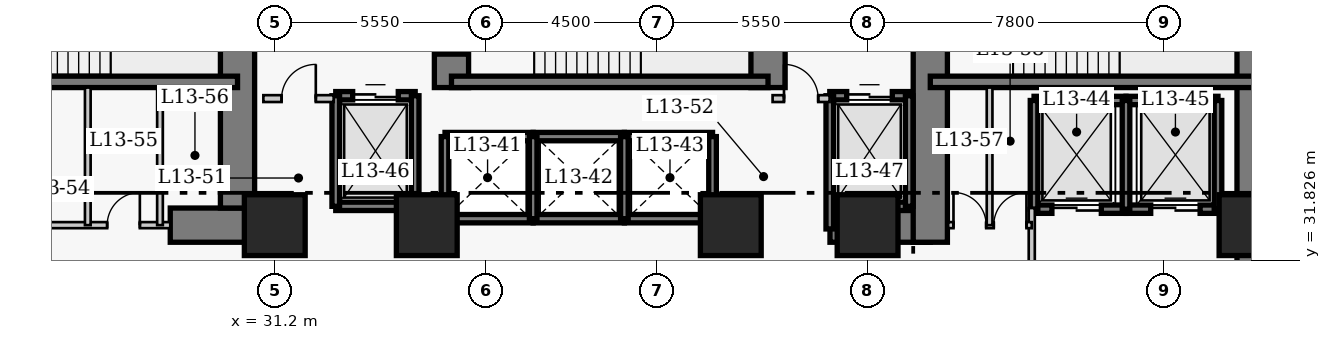
"""IFC4 building model, lengths in metres.
Left out: names, types, materials, properties, quantities, classifications, styles, units other than length and angle.
Written with IfcOpenShell. Run it as: python <this file> out.ifc"""

import sys

from ifc_helpers import new_model, si_unit, direction, frame, frame_2d, origin, origin_2d, place, context, subcontext, project, spatial, rectangle, extrude, element, fill, save


model = new_model("IFC4")
c1 = context("Model", 3, precision=1e-05, world=origin(), true_north=direction((0.0, 1.0)))
c2 = subcontext(c1, "Body", "Model", "MODEL_VIEW")
j1 = project(units=[si_unit("LENGTHUNIT", "METRE"), si_unit("PLANEANGLEUNIT", "RADIAN")], contexts=[c1])
p1 = place(None, origin())
s1 = spatial("IfcSite", under=j1, at=p1, CompositionType="ELEMENT")
p2 = place(p1, origin())
s2 = spatial("IfcBuilding", under=s1, at=p2, CompositionType="ELEMENT")
p3 = place(p2, frame((0.0, 0.0, 56.4)))
s3 = spatial("IfcBuildingStorey", under=s2, at=p3, CompositionType="ELEMENT", Elevation=56.4)
p4 = place(p3, frame((56.97, 27.05, 0.0), z_axis=(0.0, 0.0, 1.0), x_axis=(0.0, 1.0, 0.0)))
e1 = element("IfcWall", 1, at=p4, inside=s3, PredefinedType="SHEAR", context=c2, shape_type="SweptSolid", body=[
    extrude(rectangle(XDim=13.72, YDim=0.9, at=frame_2d((6.86, 0.0))), origin(), (0.0, 0.0, 1.0), 3.8),
])
p5 = place(p3, frame((28.45, 32.75, 0.0), z_axis=(0.0, 0.0, 1.0), x_axis=(1.0, 0.0, 0.0)))
e2 = element("IfcWall", 2, at=p5, inside=s3, PredefinedType="SHEAR", context=c2, shape_type="SweptSolid", body=[
    extrude(rectangle(XDim=2.4, YDim=0.9, at=frame_2d((1.2, 0.0))), origin(), (0.0, 0.0, 1.0), 3.8),
])
p6 = place(p3, frame((45.81, 32.75, 0.0), z_axis=(0.0, 0.0, 1.0), x_axis=(1.0, 0.0, 0.0)))
e3 = element("IfcWall", 3, at=p6, inside=s3, PredefinedType="SHEAR", context=c2, shape_type="SweptSolid", body=[
    extrude(rectangle(XDim=2.64, YDim=0.9, at=frame_2d((1.32, 0.0))), origin(), (0.0, 0.0, 1.0), 3.8),
])
p7 = place(p3, frame((30.22, 33.2, 0.0), z_axis=(0.0, 0.0, 1.0), x_axis=(0.0, 1.0, 0.0)))
e4 = element("IfcWall", 4, at=p7, inside=s3, PredefinedType="SHEAR", context=c2, shape_type="SweptSolid", body=[
    extrude(rectangle(XDim=7.12, YDim=0.9, at=frame_2d((3.56, 0.0))), origin(), (0.0, 0.0, 1.0), 3.8),
])
p8 = place(p3, frame((35.85, 36.37, 0.0), z_axis=(0.0, 0.0, 1.0), x_axis=(0.0, 1.0, 0.0)))
e5 = element("IfcWall", 5, at=p8, inside=s3, PredefinedType="SHEAR", context=c2, shape_type="SweptSolid", body=[
    extrude(rectangle(XDim=3.95, YDim=0.9, at=frame_2d((1.975, 0.0))), origin(), (0.0, 0.0, 1.0), 3.8),
])
p9 = place(p8, frame((0.88, 0.0, 0.0)))
e6 = element("IfcOpeningElement", 6, at=p9, cuts=e5, PredefinedType="OPENING", context=c2, shape_type="SweptSolid", body=[
    extrude(rectangle(XDim=1.1, YDim=2.15, at=frame_2d((0.55, 1.075))), frame((0.0, 0.46, 0.0), z_axis=(0.0, -1.0, 0.0), x_axis=(1.0, 0.0, 0.0)), (0.0, 0.0, 1.0), 0.92),
])
p10 = place(p3, frame((44.18, 36.37, 0.0), z_axis=(0.0, 0.0, 1.0), x_axis=(0.0, 1.0, 0.0)))
e7 = element("IfcWall", 7, at=p10, inside=s3, PredefinedType="SHEAR", context=c2, shape_type="SweptSolid", body=[
    extrude(rectangle(XDim=3.95, YDim=0.9, at=frame_2d((1.975, 0.0))), origin(), (0.0, 0.0, 1.0), 3.8),
])
p11 = place(p3, frame((48.45, 32.3, 0.0), z_axis=(0.0, 0.0, 1.0), x_axis=(0.0, 1.0, 0.0)))
e8 = element("IfcWall", 8, at=p11, inside=s3, PredefinedType="SHEAR", context=c2, shape_type="SweptSolid", body=[
    extrude(rectangle(XDim=8.02, YDim=0.9, at=frame_2d((4.01, 0.0))), origin(), (0.0, 0.0, 1.0), 3.8),
])
p12 = place(p11, frame((5.9, 0.0, 0.0)))
e9 = element("IfcOpeningElement", 9, at=p12, cuts=e8, PredefinedType="OPENING", context=c2, shape_type="SweptSolid", body=[
    extrude(rectangle(XDim=1.1, YDim=2.15, at=frame_2d((0.55, 1.075))), frame((0.0, 0.46, 0.0), z_axis=(0.0, -1.0, 0.0), x_axis=(1.0, 0.0, 0.0)), (0.0, 0.0, 1.0), 0.92),
])
p13 = place(p3, frame((21.9, 36.52, 0.0), z_axis=(0.0, 0.0, 1.0), x_axis=(1.0, 0.0, 0.0)))
e10 = element("IfcWall", 10, at=p13, inside=s3, PredefinedType="SHEAR", context=c2, shape_type="SweptSolid", body=[
    extrude(rectangle(XDim=8.32, YDim=0.3, at=frame_2d((4.16, 0.0))), origin(), (0.0, 0.0, 1.0), 3.8),
])
p14 = place(p13, frame((0.9, 0.0, 0.0)))
e11 = element("IfcOpeningElement", 11, at=p14, cuts=e10, PredefinedType="OPENING", context=c2, shape_type="SweptSolid", body=[
    extrude(rectangle(XDim=1.1, YDim=2.15, at=frame_2d((0.55, 1.075))), frame((0.0, 0.16, 0.0), z_axis=(0.0, -1.0, 0.0), x_axis=(1.0, 0.0, 0.0)), (0.0, 0.0, 1.0), 0.32),
])
p15 = place(p3, frame((35.85, 36.52, 0.0), z_axis=(0.0, 0.0, 1.0), x_axis=(1.0, 0.0, 0.0)))
e12 = element("IfcWall", 12, at=p15, inside=s3, PredefinedType="SHEAR", context=c2, shape_type="SweptSolid", body=[
    extrude(rectangle(XDim=8.33, YDim=0.3, at=frame_2d((4.165, 0.0))), origin(), (0.0, 0.0, 1.0), 3.8),
])
p16 = place(p3, frame((48.45, 36.52, 0.0), z_axis=(0.0, 0.0, 1.0), x_axis=(1.0, 0.0, 0.0)))
e13 = element("IfcWall", 13, at=p16, inside=s3, PredefinedType="SHEAR", context=c2, shape_type="SweptSolid", body=[
    extrude(rectangle(XDim=8.52, YDim=0.3, at=frame_2d((4.26, 0.0))), origin(), (0.0, 0.0, 1.0), 3.8),
])
for number, where, z_axis, x_axis in (
    (14, (31.2, 32.75, 0.0), (0.0, 0.0, 1.0), (1.0, 0.0, 0.0)),
    (15, (35.2, 32.75, 0.0), (0.0, 0.0, 1.0), (1.0, 0.0, 0.0)),
    (16, (43.2, 32.75, 0.0), (0.0, 0.0, 1.0), (1.0, 0.0, 0.0)),
    (17, (46.8, 32.75, 0.0), (0.0, 0.0, 1.0), (1.0, 0.0, 0.0)),
    (18, (56.85, 32.75, 0.0), (0.0, 0.0, 1.0), (1.0, 0.0, 0.0)),
):
    element("IfcColumn", number, at=place(p3, frame(where, z_axis=z_axis, x_axis=x_axis)), inside=s3, PredefinedType="COLUMN", context=c2, shape_type="SweptSolid", body=[
        extrude(rectangle(XDim=1.6, YDim=1.6, at=origin_2d()), origin(), (0.0, 0.0, 1.0), 3.8),
    ])
for number, where, z_axis, x_axis in (
    (19, (35.68, 35.08, 0.0), (0.0, 0.0, 1.0), (1.0, 0.0, 0.0)),
    (20, (35.68, 32.92, 0.0), (0.0, 0.0, 1.0), (1.0, 0.0, 0.0)),
):
    element("IfcWall", number, at=place(p3, frame(where, z_axis=z_axis, x_axis=x_axis)), inside=s3, PredefinedType="SHEAR", context=c2, shape_type="SweptSolid", body=[
        extrude(rectangle(XDim=2.32, YDim=0.22, at=frame_2d((1.16, 0.0))), origin(), (0.0, 0.0, 1.0), 3.8),
    ])
p17 = place(p3, frame((35.68, 32.92, 0.0), z_axis=(0.0, 0.0, 1.0), x_axis=(0.0, 1.0, 0.0)))
e21 = element("IfcWall", 21, at=p17, inside=s3, PredefinedType="SHEAR", context=c2, shape_type="SweptSolid", body=[
    extrude(rectangle(XDim=2.16, YDim=0.2, at=frame_2d((1.08, 0.0))), origin(), (0.0, 0.0, 1.0), 3.8),
])
for number, where, z_axis, x_axis in (
    (22, (38.0, 35.08, 0.0), (0.0, 0.0, 1.0), (1.0, 0.0, 0.0)),
    (23, (38.0, 32.92, 0.0), (0.0, 0.0, 1.0), (1.0, 0.0, 0.0)),
):
    element("IfcWall", number, at=place(p3, frame(where, z_axis=z_axis, x_axis=x_axis)), inside=s3, PredefinedType="SHEAR", context=c2, shape_type="SweptSolid", body=[
        extrude(rectangle(XDim=2.4, YDim=0.22, at=frame_2d((1.2, 0.0))), origin(), (0.0, 0.0, 1.0), 3.8),
    ])
p18 = place(p3, frame((38.0, 32.92, 0.0), z_axis=(0.0, 0.0, 1.0), x_axis=(0.0, 1.0, 0.0)))
e24 = element("IfcWall", 24, at=p18, inside=s3, PredefinedType="SHEAR", context=c2, shape_type="SweptSolid", body=[
    extrude(rectangle(XDim=2.16, YDim=0.2, at=frame_2d((1.08, 0.0))), origin(), (0.0, 0.0, 1.0), 3.8),
])
for number, where, z_axis, x_axis in (
    (25, (40.4, 35.08, 0.0), (0.0, 0.0, 1.0), (1.0, 0.0, 0.0)),
    (26, (40.4, 32.92, 0.0), (0.0, 0.0, 1.0), (1.0, 0.0, 0.0)),
):
    element("IfcWall", number, at=place(p3, frame(where, z_axis=z_axis, x_axis=x_axis)), inside=s3, PredefinedType="SHEAR", context=c2, shape_type="SweptSolid", body=[
        extrude(rectangle(XDim=2.32, YDim=0.22, at=frame_2d((1.16, 0.0))), origin(), (0.0, 0.0, 1.0), 3.8),
    ])
for number, where, z_axis, x_axis in (
    (27, (40.4, 32.92, 0.0), (0.0, 0.0, 1.0), (0.0, 1.0, 0.0)),
    (28, (42.72, 32.92, 0.0), (0.0, 0.0, 1.0), (0.0, 1.0, 0.0)),
):
    element("IfcWall", number, at=place(p3, frame(where, z_axis=z_axis, x_axis=x_axis)), inside=s3, PredefinedType="SHEAR", context=c2, shape_type="SweptSolid", body=[
        extrude(rectangle(XDim=2.16, YDim=0.2, at=frame_2d((1.08, 0.0))), origin(), (0.0, 0.0, 1.0), 3.8),
    ])
p19 = place(p3, frame((51.18, 36.03, 0.0), z_axis=(0.0, 0.0, 1.0), x_axis=(1.0, 0.0, 0.0)))
e29 = element("IfcWall", 29, at=p19, inside=s3, PredefinedType="SHEAR", context=c2, shape_type="SweptSolid", body=[
    extrude(rectangle(XDim=2.42, YDim=0.22, at=frame_2d((1.21, 0.0))), origin(), (0.0, 0.0, 1.0), 3.8),
])
p20 = place(p3, frame((51.18, 33.17, 0.0), z_axis=(0.0, 0.0, 1.0), x_axis=(1.0, 0.0, 0.0)))
e30 = element("IfcWall", 30, at=p20, inside=s3, PredefinedType="SHEAR", context=c2, shape_type="SweptSolid", body=[
    extrude(rectangle(XDim=2.42, YDim=0.22, at=frame_2d((1.21, 0.0))), origin(), (0.0, 0.0, 1.0), 3.8),
])
p21 = place(p20, frame((0.47, 0.0, 0.0)))
e31 = element("IfcOpeningElement", 31, at=p21, cuts=e30, PredefinedType="OPENING", context=c2, shape_type="SweptSolid", body=[
    extrude(rectangle(XDim=1.3, YDim=2.15, at=frame_2d((0.65, 1.075))), frame((0.0, 0.12, 0.0), z_axis=(0.0, -1.0, 0.0), x_axis=(1.0, 0.0, 0.0)), (0.0, 0.0, 1.0), 0.24),
])
p22 = place(p3, frame((51.18, 33.17, 0.0), z_axis=(0.0, 0.0, 1.0), x_axis=(0.0, 1.0, 0.0)))
e32 = element("IfcWall", 32, at=p22, inside=s3, PredefinedType="SHEAR", context=c2, shape_type="SweptSolid", body=[
    extrude(rectangle(XDim=2.86, YDim=0.2, at=frame_2d((1.43, 0.0))), origin(), (0.0, 0.0, 1.0), 3.8),
])
p23 = place(p3, frame((53.6, 36.03, 0.0), z_axis=(0.0, 0.0, 1.0), x_axis=(1.0, 0.0, 0.0)))
e33 = element("IfcWall", 33, at=p23, inside=s3, PredefinedType="SHEAR", context=c2, shape_type="SweptSolid", body=[
    extrude(rectangle(XDim=2.42, YDim=0.22, at=frame_2d((1.21, 0.0))), origin(), (0.0, 0.0, 1.0), 3.8),
])
p24 = place(p3, frame((53.6, 33.17, 0.0), z_axis=(0.0, 0.0, 1.0), x_axis=(1.0, 0.0, 0.0)))
e34 = element("IfcWall", 34, at=p24, inside=s3, PredefinedType="SHEAR", context=c2, shape_type="SweptSolid", body=[
    extrude(rectangle(XDim=2.42, YDim=0.22, at=frame_2d((1.21, 0.0))), origin(), (0.0, 0.0, 1.0), 3.8),
])
p25 = place(p24, frame((0.65, 0.0, 0.0)))
e35 = element("IfcOpeningElement", 35, at=p25, cuts=e34, PredefinedType="OPENING", context=c2, shape_type="SweptSolid", body=[
    extrude(rectangle(XDim=1.3, YDim=2.15, at=frame_2d((0.65, 1.075))), frame((0.0, 0.12, 0.0), z_axis=(0.0, -1.0, 0.0), x_axis=(1.0, 0.0, 0.0)), (0.0, 0.0, 1.0), 0.24),
])
for number, where, z_axis, x_axis in (
    (36, (53.6, 33.17, 0.0), (0.0, 0.0, 1.0), (0.0, 1.0, 0.0)),
    (37, (56.02, 33.17, 0.0), (0.0, 0.0, 1.0), (0.0, 1.0, 0.0)),
):
    element("IfcWall", number, at=place(p3, frame(where, z_axis=z_axis, x_axis=x_axis)), inside=s3, PredefinedType="SHEAR", context=c2, shape_type="SweptSolid", body=[
        extrude(rectangle(XDim=2.86, YDim=0.2, at=frame_2d((1.43, 0.0))), origin(), (0.0, 0.0, 1.0), 3.8),
    ])
p26 = place(p3, frame((32.805, 36.155, 0.0), z_axis=(0.0, 0.0, 1.0), x_axis=(1.0, 0.0, 0.0)))
e38 = element("IfcWall", 38, at=p26, inside=s3, PredefinedType="SHEAR", context=c2, shape_type="SweptSolid", body=[
    extrude(rectangle(XDim=2.09, YDim=0.22, at=frame_2d((1.045, 0.0))), origin(), (0.0, 0.0, 1.0), 3.8),
])
p27 = place(p26, frame((0.445, 0.0, 0.0)))
e39 = element("IfcOpeningElement", 39, at=p27, cuts=e38, PredefinedType="OPENING", context=c2, shape_type="SweptSolid", body=[
    extrude(rectangle(XDim=1.2, YDim=2.15, at=frame_2d((0.6, 1.075))), frame((0.0, 0.12, 0.0), z_axis=(0.0, -1.0, 0.0), x_axis=(1.0, 0.0, 0.0)), (0.0, 0.0, 1.0), 0.24),
])
p28 = place(p3, frame((32.805, 33.245, 0.0), z_axis=(0.0, 0.0, 1.0), x_axis=(1.0, 0.0, 0.0)))
e40 = element("IfcWall", 40, at=p28, inside=s3, PredefinedType="SHEAR", context=c2, shape_type="SweptSolid", body=[
    extrude(rectangle(XDim=2.09, YDim=0.22, at=frame_2d((1.045, 0.0))), origin(), (0.0, 0.0, 1.0), 3.8),
])
for number, where, z_axis, x_axis in (
    (41, (32.805, 33.245, 0.0), (0.0, 0.0, 1.0), (0.0, 1.0, 0.0)),
    (42, (34.895, 33.245, 0.0), (0.0, 0.0, 1.0), (0.0, 1.0, 0.0)),
):
    element("IfcWall", number, at=place(p3, frame(where, z_axis=z_axis, x_axis=x_axis)), inside=s3, PredefinedType="SHEAR", context=c2, shape_type="SweptSolid", body=[
        extrude(rectangle(XDim=2.91, YDim=0.2, at=frame_2d((1.455, 0.0))), origin(), (0.0, 0.0, 1.0), 3.8),
    ])
p29 = place(p3, frame((45.805, 36.155, 0.0), z_axis=(0.0, 0.0, 1.0), x_axis=(1.0, 0.0, 0.0)))
e43 = element("IfcWall", 43, at=p29, inside=s3, PredefinedType="SHEAR", context=c2, shape_type="SweptSolid", body=[
    extrude(rectangle(XDim=2.09, YDim=0.22, at=frame_2d((1.045, 0.0))), origin(), (0.0, 0.0, 1.0), 3.8),
])
p30 = place(p29, frame((0.445, 0.0, 0.0)))
e44 = element("IfcOpeningElement", 44, at=p30, cuts=e43, PredefinedType="OPENING", context=c2, shape_type="SweptSolid", body=[
    extrude(rectangle(XDim=1.2, YDim=2.15, at=frame_2d((0.6, 1.075))), frame((0.0, 0.12, 0.0), z_axis=(0.0, -1.0, 0.0), x_axis=(1.0, 0.0, 0.0)), (0.0, 0.0, 1.0), 0.24),
])
p31 = place(p3, frame((45.805, 33.245, 0.0), z_axis=(0.0, 0.0, 1.0), x_axis=(1.0, 0.0, 0.0)))
e45 = element("IfcWall", 45, at=p31, inside=s3, PredefinedType="SHEAR", context=c2, shape_type="SweptSolid", body=[
    extrude(rectangle(XDim=2.09, YDim=0.22, at=frame_2d((1.045, 0.0))), origin(), (0.0, 0.0, 1.0), 3.8),
])
p32 = place(p3, frame((45.805, 32.65, 0.0), z_axis=(0.0, 0.0, 1.0), x_axis=(0.0, 1.0, 0.0)))
e46 = element("IfcWall", 46, at=p32, inside=s3, PredefinedType="SHEAR", context=c2, shape_type="SweptSolid", body=[
    extrude(rectangle(XDim=3.505, YDim=0.2, at=frame_2d((1.752, 0.0))), origin(), (0.0, 0.0, 1.0), 3.8),
])
p33 = place(p3, frame((47.895, 33.245, 0.0), z_axis=(0.0, 0.0, 1.0), x_axis=(0.0, 1.0, 0.0)))
e47 = element("IfcWall", 47, at=p33, inside=s3, PredefinedType="SHEAR", context=c2, shape_type="SweptSolid", body=[
    extrude(rectangle(XDim=2.91, YDim=0.2, at=frame_2d((1.455, 0.0))), origin(), (0.0, 0.0, 1.0), 3.8),
])
p34 = place(p3, frame((30.9, 36.08, 0.0), z_axis=(0.0, 0.0, 1.0), x_axis=(1.0, 0.0, 0.0)))
e48 = element("IfcWall", 48, at=p34, inside=s3, PredefinedType="PARTITIONING", context=c2, shape_type="SweptSolid", body=[
    extrude(rectangle(XDim=1.85, YDim=0.18, at=frame_2d((0.925, 0.0))), origin(), (0.0, 0.0, 1.0), 3.54),
])
p35 = place(p34, frame((0.48, 0.0, 0.0)))
e49 = element("IfcOpeningElement", 49, at=p35, cuts=e48, PredefinedType="OPENING", context=c2, shape_type="SweptSolid", body=[
    extrude(rectangle(XDim=0.9, YDim=2.15, at=frame_2d((0.45, 1.075))), frame((0.0, 0.1, 0.0), z_axis=(0.0, -1.0, 0.0), x_axis=(1.0, 0.0, 0.0)), (0.0, 0.0, 1.0), 0.2),
])
p36 = place(p3, frame((44.3, 36.08, 0.0), z_axis=(0.0, 0.0, 1.0), x_axis=(1.0, 0.0, 0.0)))
e50 = element("IfcWall", 50, at=p36, inside=s3, PredefinedType="PARTITIONING", context=c2, shape_type="SweptSolid", body=[
    extrude(rectangle(XDim=1.5, YDim=0.18, at=frame_2d((0.75, 0.0))), origin(), (0.0, 0.0, 1.0), 3.54),
])
p37 = place(p36, frame((0.3, 0.0, 0.0)))
e51 = element("IfcOpeningElement", 51, at=p37, cuts=e50, PredefinedType="OPENING", context=c2, shape_type="SweptSolid", body=[
    extrude(rectangle(XDim=0.9, YDim=2.15, at=frame_2d((0.45, 1.075))), frame((0.0, 0.1, 0.0), z_axis=(0.0, -1.0, 0.0), x_axis=(1.0, 0.0, 0.0)), (0.0, 0.0, 1.0), 0.2),
])
p38 = place(p3, frame((51.12, 29.5, 0.0), z_axis=(0.0, 0.0, 1.0), x_axis=(0.0, 1.0, 0.0)))
e52 = element("IfcWall", 52, at=p38, inside=s3, PredefinedType="PARTITIONING", context=c2, shape_type="SweptSolid", body=[
    extrude(rectangle(XDim=3.7, YDim=0.16, at=frame_2d((1.85, 0.0))), origin(), (0.0, 0.0, 1.0), 3.54),
])
p39 = place(p38, frame((0.9, 0.0, 0.0)))
e53 = element("IfcOpeningElement", 53, at=p39, cuts=e52, PredefinedType="OPENING", context=c2, shape_type="SweptSolid", body=[
    extrude(rectangle(XDim=1.1, YDim=2.15, at=frame_2d((0.55, 1.075))), frame((0.0, 0.09, 0.0), z_axis=(0.0, -1.0, 0.0), x_axis=(1.0, 0.0, 0.0)), (0.0, 0.0, 1.0), 0.18),
])
p40 = place(p3, frame((24.48, 32.75, 0.0), z_axis=(0.0, 0.0, 1.0), x_axis=(1.0, 0.0, 0.0)))
e54 = element("IfcWall", 54, at=p40, inside=s3, PredefinedType="PARTITIONING", context=c2, shape_type="SweptSolid", body=[
    extrude(rectangle(XDim=3.97, YDim=0.16, at=frame_2d((1.985, 0.0))), origin(), (0.0, 0.0, 1.0), 3.54),
])
p41 = place(p40, frame((2.31, 0.0, 0.0)))
e55 = element("IfcOpeningElement", 55, at=p41, cuts=e54, PredefinedType="OPENING", context=c2, shape_type="SweptSolid", body=[
    extrude(rectangle(XDim=0.86, YDim=2.05, at=frame_2d((0.43, 1.025))), frame((0.0, 0.09, 0.0), z_axis=(0.0, -1.0, 0.0), x_axis=(1.0, 0.0, 0.0)), (0.0, 0.0, 1.0), 0.18),
])
p42 = place(p3, frame((48.92, 32.75, 0.0), z_axis=(0.0, 0.0, 1.0), x_axis=(1.0, 0.0, 0.0)))
e56 = element("IfcWall", 56, at=p42, inside=s3, PredefinedType="PARTITIONING", context=c2, shape_type="SweptSolid", body=[
    extrude(rectangle(XDim=2.2, YDim=0.16, at=frame_2d((1.1, 0.0))), origin(), (0.0, 0.0, 1.0), 3.54),
])
p43 = place(p42, frame((0.14, 0.0, 0.0)))
e57 = element("IfcOpeningElement", 57, at=p43, cuts=e56, PredefinedType="OPENING", context=c2, shape_type="SweptSolid", body=[
    extrude(rectangle(XDim=0.86, YDim=2.05, at=frame_2d((0.43, 1.025))), frame((0.0, 0.09, 0.0), z_axis=(0.0, -1.0, 0.0), x_axis=(1.0, 0.0, 0.0)), (0.0, 0.0, 1.0), 0.18),
])
p44 = place(p42, frame((1.2, 0.0, 0.0)))
e58 = element("IfcOpeningElement", 58, at=p44, cuts=e56, PredefinedType="OPENING", context=c2, shape_type="SweptSolid", body=[
    extrude(rectangle(XDim=0.86, YDim=2.05, at=frame_2d((0.43, 1.025))), frame((0.0, 0.09, 0.0), z_axis=(0.0, -1.0, 0.0), x_axis=(1.0, 0.0, 0.0)), (0.0, 0.0, 1.0), 0.18),
])
for number, where, z_axis, x_axis in (
    (59, (26.28, 32.75, 0.0), (0.0, 0.0, 1.0), (0.0, 1.0, 0.0)),
    (60, (28.18, 32.75, 0.0), (0.0, 0.0, 1.0), (0.0, 1.0, 0.0)),
    (61, (50.01, 32.75, 0.0), (0.0, 0.0, 1.0), (0.0, 1.0, 0.0)),
):
    element("IfcWall", number, at=place(p3, frame(where, z_axis=z_axis, x_axis=x_axis)), inside=s3, PredefinedType="PARTITIONING", context=c2, shape_type="SweptSolid", body=[
        extrude(rectangle(XDim=3.62, YDim=0.15, at=frame_2d((1.81, 0.0))), origin(), (0.0, 0.0, 1.0), 3.54),
    ])
p45 = place(p21, origin())
e62 = element("IfcDoor", 62, at=p45, inside=s3, OperationType="DOUBLE_DOOR_SLIDING", PredefinedType="DOOR", context=c2, shape_type="SweptSolid", body=[
    extrude(rectangle(XDim=1.3, YDim=2.15, at=frame_2d((0.65, 1.075))), frame((0.0, 0.025, 0.0), z_axis=(0.0, -1.0, 0.0), x_axis=(1.0, 0.0, 0.0)), (0.0, 0.0, 1.0), 0.05),
])
fill(e31, e62)
p46 = place(p25, origin())
e63 = element("IfcDoor", 63, at=p46, inside=s3, OperationType="DOUBLE_DOOR_SLIDING", PredefinedType="DOOR", context=c2, shape_type="SweptSolid", body=[
    extrude(rectangle(XDim=1.3, YDim=2.15, at=frame_2d((0.65, 1.075))), frame((0.0, 0.025, 0.0), z_axis=(0.0, -1.0, 0.0), x_axis=(1.0, 0.0, 0.0)), (0.0, 0.0, 1.0), 0.05),
])
fill(e35, e63)
p47 = place(p27, origin())
e64 = element("IfcDoor", 64, at=p47, inside=s3, OperationType="DOUBLE_DOOR_SLIDING", PredefinedType="DOOR", context=c2, shape_type="SweptSolid", body=[
    extrude(rectangle(XDim=1.2, YDim=2.15, at=frame_2d((0.6, 1.075))), frame((0.0, 0.025, 0.0), z_axis=(0.0, -1.0, 0.0), x_axis=(1.0, 0.0, 0.0)), (0.0, 0.0, 1.0), 0.05),
])
fill(e39, e64)
p48 = place(p30, origin())
e65 = element("IfcDoor", 65, at=p48, inside=s3, OperationType="DOUBLE_DOOR_SLIDING", PredefinedType="DOOR", context=c2, shape_type="SweptSolid", body=[
    extrude(rectangle(XDim=1.2, YDim=2.15, at=frame_2d((0.6, 1.075))), frame((0.0, 0.025, 0.0), z_axis=(0.0, -1.0, 0.0), x_axis=(1.0, 0.0, 0.0)), (0.0, 0.0, 1.0), 0.05),
])
fill(e44, e65)
p49 = place(p35, origin())
e66 = element("IfcDoor", 66, at=p49, inside=s3, OperationType="SINGLE_SWING_RIGHT", PredefinedType="DOOR", context=c2, shape_type="SweptSolid", body=[
    extrude(rectangle(XDim=0.9, YDim=2.15, at=frame_2d((0.45, 1.075))), frame((0.0, 0.025, 0.0), z_axis=(0.0, -1.0, 0.0), x_axis=(1.0, 0.0, 0.0)), (0.0, 0.0, 1.0), 0.05),
])
fill(e49, e66)
p50 = place(p37, origin())
e67 = element("IfcDoor", 67, at=p50, inside=s3, OperationType="SINGLE_SWING_LEFT", PredefinedType="DOOR", context=c2, shape_type="SweptSolid", body=[
    extrude(rectangle(XDim=0.9, YDim=2.15, at=frame_2d((0.45, 1.075))), frame((0.0, 0.025, 0.0), z_axis=(0.0, -1.0, 0.0), x_axis=(1.0, 0.0, 0.0)), (0.0, 0.0, 1.0), 0.05),
])
fill(e51, e67)
p51 = place(p41, origin())
e68 = element("IfcDoor", 68, at=p51, inside=s3, OperationType="SINGLE_SWING_RIGHT", PredefinedType="DOOR", context=c2, shape_type="SweptSolid", body=[
    extrude(rectangle(XDim=0.86, YDim=2.05, at=frame_2d((0.43, 1.025))), frame((0.0, 0.025, 0.0), z_axis=(0.0, -1.0, 0.0), x_axis=(1.0, 0.0, 0.0)), (0.0, 0.0, 1.0), 0.05),
])
fill(e55, e68)
p52 = place(p43, origin())
e69 = element("IfcDoor", 69, at=p52, inside=s3, OperationType="SINGLE_SWING_LEFT", PredefinedType="DOOR", context=c2, shape_type="SweptSolid", body=[
    extrude(rectangle(XDim=0.86, YDim=2.05, at=frame_2d((0.43, 1.025))), frame((0.0, 0.025, 0.0), z_axis=(0.0, -1.0, 0.0), x_axis=(1.0, 0.0, 0.0)), (0.0, 0.0, 1.0), 0.05),
])
fill(e57, e69)
p53 = place(p44, origin())
e70 = element("IfcDoor", 70, at=p53, inside=s3, OperationType="SINGLE_SWING_RIGHT", PredefinedType="DOOR", context=c2, shape_type="SweptSolid", body=[
    extrude(rectangle(XDim=0.86, YDim=2.05, at=frame_2d((0.43, 1.025))), frame((0.0, 0.025, 0.0), z_axis=(0.0, -1.0, 0.0), x_axis=(1.0, 0.0, 0.0)), (0.0, 0.0, 1.0), 0.05),
])
fill(e58, e70)
p54 = place(p9, origin())
e71 = element("IfcDoor", 71, at=p54, inside=s3, OperationType="SINGLE_SWING_RIGHT", PredefinedType="DOOR", context=c2, shape_type="SweptSolid", body=[
    extrude(rectangle(XDim=1.1, YDim=2.15, at=frame_2d((0.55, 1.075))), frame((0.0, 0.025, 0.0), z_axis=(0.0, -1.0, 0.0), x_axis=(1.0, 0.0, 0.0)), (0.0, 0.0, 1.0), 0.05),
])
fill(e6, e71)
save(model, sys.argv[1])
